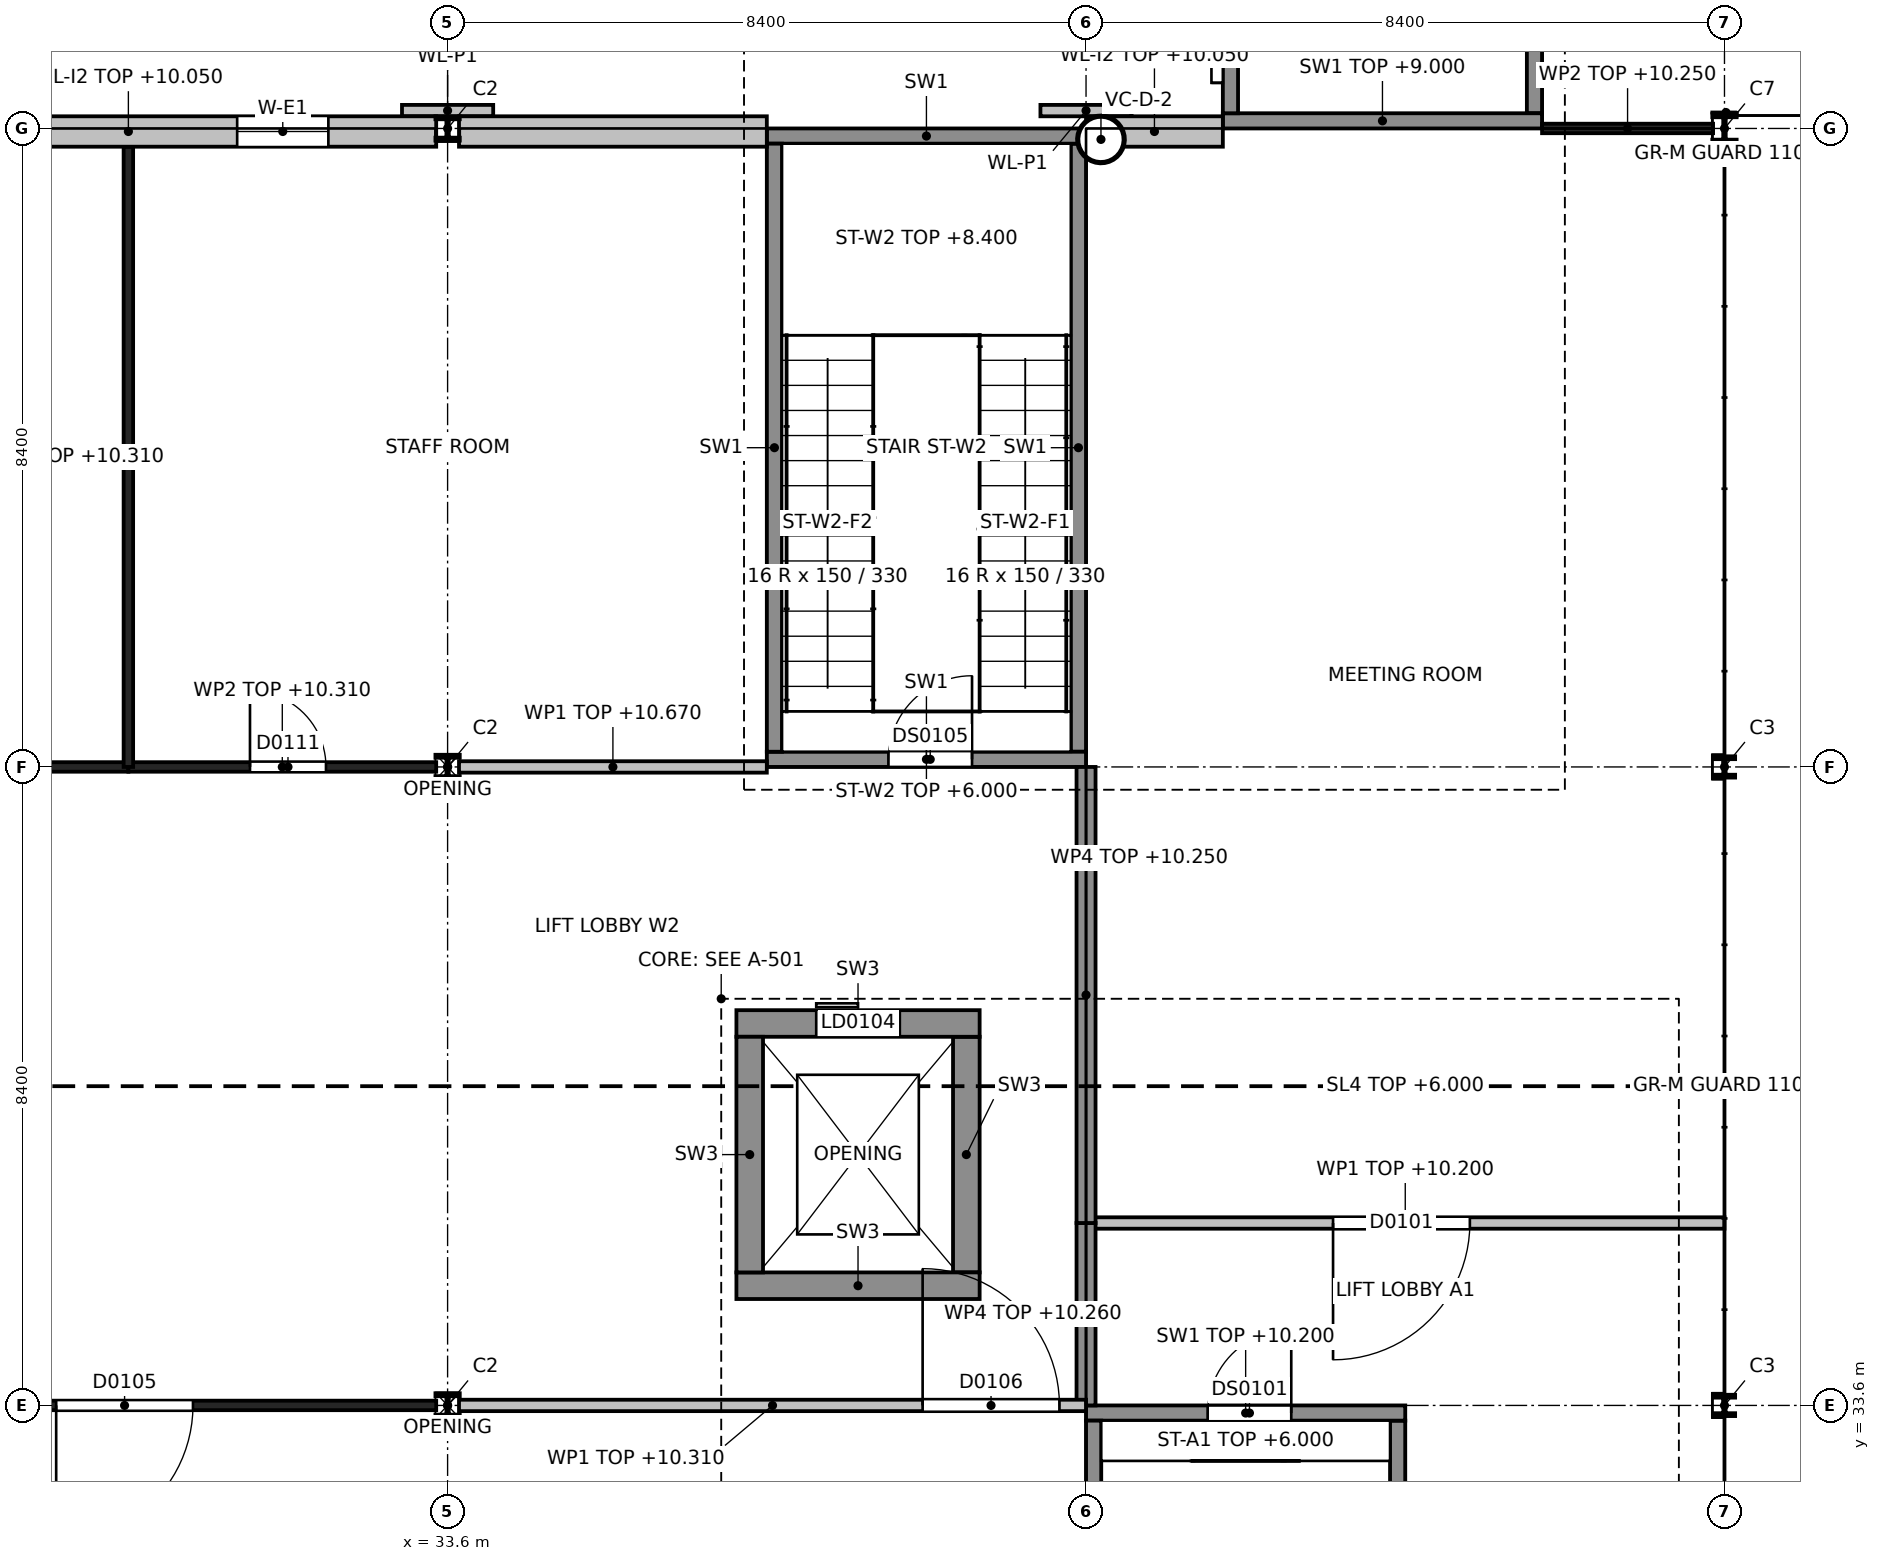
"""IFC4 building model, lengths in metres.
Left out: names, types, materials, properties, quantities, classifications, styles, units other than length and angle.
Written with IfcOpenShell. Run it as: python <this file> out.ifc"""

import sys

from ifc_helpers import new_model, si_unit, direction, frame, frame_2d, origin, origin_2d, place, context, subcontext, project, spatial, rectangle, hollow_circle, i_section, extrude, element, fill, save


model = new_model("IFC4")
c1 = context("Model", 3, precision=1e-05, world=origin(), true_north=direction((0.0, 1.0)))
c2 = subcontext(c1, "Body", "Model", "MODEL_VIEW")
j1 = project(units=[si_unit("LENGTHUNIT", "METRE"), si_unit("PLANEANGLEUNIT", "RADIAN")], contexts=[c1])
p1 = place(None, origin())
s1 = spatial("IfcSite", under=j1, at=p1, CompositionType="ELEMENT")
p2 = place(p1, origin())
s2 = spatial("IfcBuilding", under=s1, at=p2, CompositionType="ELEMENT")
p3 = place(p2, frame((0.0, 0.0, 6.0)))
s3 = spatial("IfcBuildingStorey", under=s2, at=p3, CompositionType="ELEMENT", Elevation=6.0)
p4 = place(p3, frame((42.211, 50.276, 0.0), z_axis=(-0.012102581287, -0.016831741202, 0.999785086913), x_axis=(0.811906374981, -0.583787665394, 0.0)))
e1 = element("IfcColumn", 1, at=p4, inside=s3, PredefinedType="COLUMN", context=c2, shape_type="SweptSolid", body=[
    extrude(hollow_circle(Radius=0.305, WallThickness=0.02, at=origin_2d()), origin(), (0.0, 0.0, 1.0), 4.801),
])
for number, where, z_axis, x_axis in (
    (2, (33.6, 33.6, 0.0), (0.0, 0.0, 1.0), (1.0, 0.0, 0.0)),
    (3, (33.6, 42.0, 0.0), (0.0, 0.0, 1.0), (1.0, 0.0, 0.0)),
    (4, (33.6, 50.4, 0.0), (0.0, 0.0, 1.0), (1.0, 0.0, 0.0)),
):
    element("IfcColumn", number, at=place(p3, frame(where, z_axis=z_axis, x_axis=x_axis)), inside=s3, PredefinedType="COLUMN", context=c2, shape_type="SweptSolid", body=[
        extrude(i_section(OverallWidth=0.3, OverallDepth=0.3, WebThickness=0.011, FlangeThickness=0.019, at=origin_2d()), origin(), (0.0, 0.0, 1.0), 4.8),
    ])
for number, where, z_axis, x_axis in (
    (5, (50.4, 33.6, 0.0), (0.0, 0.0, 1.0), (1.0, 0.0, 0.0)),
    (6, (50.4, 42.0, 0.0), (0.0, 0.0, 1.0), (1.0, 0.0, 0.0)),
):
    element("IfcColumn", number, at=place(p3, frame(where, z_axis=z_axis, x_axis=x_axis)), inside=s3, PredefinedType="COLUMN", context=c2, shape_type="SweptSolid", body=[
        extrude(i_section(OverallWidth=0.26, OverallDepth=0.26, WebThickness=0.01, FlangeThickness=0.018, at=origin_2d()), origin(), (0.0, 0.0, 1.0), 4.8),
    ])
p5 = place(p3, frame((50.4, 50.4, 0.0), z_axis=(0.0, 0.0, 1.0), x_axis=(1.0, 0.0, 0.0)))
e7 = element("IfcColumn", 7, at=p5, inside=s3, PredefinedType="COLUMN", context=c2, shape_type="SweptSolid", body=[
    extrude(i_section(OverallWidth=0.3, OverallDepth=0.36, WebThickness=0.012, FlangeThickness=0.022, at=origin_2d()), origin(), (0.0, 0.0, 1.0), 4.8),
])
p6 = place(p3, frame((42.0, 33.5, 0.0), z_axis=(0.0, 0.0, 1.0), x_axis=(1.0, 0.0, 0.0)))
e8 = element("IfcWall", 8, at=p6, inside=s3, PredefinedType="SHEAR", context=c2, shape_type="SweptSolid", body=[
    extrude(rectangle(XDim=4.2, YDim=0.2, at=frame_2d((2.1, 0.0))), origin(), (0.0, 0.0, 1.0), 4.2),
])
p7 = place(p6, frame((1.6, 0.0, 0.0)))
e9 = element("IfcOpeningElement", 9, at=p7, cuts=e8, PredefinedType="OPENING", context=c2, shape_type="SweptSolid", body=[
    extrude(rectangle(XDim=1.1, YDim=2.1, at=frame_2d((0.55, 1.05))), frame((0.0, 0.1, 0.0), z_axis=(0.0, -1.0, 0.0), x_axis=(1.0, 0.0, 0.0)), (0.0, 0.0, 1.0), 0.2),
])
for number, where, z_axis, x_axis in (
    (10, (42.1, 25.4, 0.0), (0.0, 0.0, 1.0), (0.0, 1.0, 0.0)),
    (11, (46.1, 25.4, 0.0), (0.0, 0.0, 1.0), (0.0, 1.0, 0.0)),
):
    element("IfcWall", number, at=place(p3, frame(where, z_axis=z_axis, x_axis=x_axis)), inside=s3, PredefinedType="SHEAR", context=c2, shape_type="SweptSolid", body=[
        extrude(rectangle(XDim=8.0, YDim=0.2, at=frame_2d((4.0, 0.0))), origin(), (0.0, 0.0, 1.0), 4.2),
    ])
p8 = place(p3, frame((43.8, 50.5, 0.0), z_axis=(0.0, 0.0, 1.0), x_axis=(1.0, 0.0, 0.0)))
e12 = element("IfcWall", 12, at=p8, inside=s3, PredefinedType="SHEAR", context=c2, shape_type="SweptSolid", body=[
    extrude(rectangle(XDim=4.2, YDim=0.2, at=frame_2d((2.1, 0.0))), origin(), (0.0, 0.0, 1.0), 3.0),
])
for number, where, z_axis, x_axis in (
    (13, (43.9, 50.6, 0.0), (0.0, 0.0, 1.0), (0.0, 1.0, 0.0)),
    (14, (47.9, 50.6, 0.0), (0.0, 0.0, 1.0), (0.0, 1.0, 0.0)),
):
    element("IfcWall", number, at=place(p3, frame(where, z_axis=z_axis, x_axis=x_axis)), inside=s3, PredefinedType="SHEAR", context=c2, shape_type="SweptSolid", body=[
        extrude(rectangle(XDim=8.0, YDim=0.2, at=frame_2d((4.0, 0.0))), origin(), (0.0, 0.0, 1.0), 3.0),
    ])
p9 = place(p3, frame((37.8, 42.1, 0.0), z_axis=(0.0, 0.0, 1.0), x_axis=(1.0, 0.0, 0.0)))
e15 = element("IfcWall", 15, at=p9, inside=s3, PredefinedType="SHEAR", context=c2, shape_type="SweptSolid", body=[
    extrude(rectangle(XDim=4.2, YDim=0.2, at=frame_2d((2.1, 0.0))), origin(), (0.0, 0.0, 1.0), 4.8),
])
p10 = place(p9, frame((1.6, 0.0, 0.0)))
e16 = element("IfcOpeningElement", 16, at=p10, cuts=e15, PredefinedType="OPENING", context=c2, shape_type="SweptSolid", body=[
    extrude(rectangle(XDim=1.1, YDim=2.1, at=frame_2d((0.55, 1.05))), frame((0.0, 0.1, 0.0), z_axis=(0.0, -1.0, 0.0), x_axis=(1.0, 0.0, 0.0)), (0.0, 0.0, 1.0), 0.2),
])
p11 = place(p3, frame((37.8, 50.3, 0.0), z_axis=(0.0, 0.0, 1.0), x_axis=(1.0, 0.0, 0.0)))
e17 = element("IfcWall", 17, at=p11, inside=s3, PredefinedType="SHEAR", context=c2, shape_type="SweptSolid", body=[
    extrude(rectangle(XDim=4.2, YDim=0.2, at=frame_2d((2.1, 0.0))), origin(), (0.0, 0.0, 1.0), 4.8),
])
for number, where, z_axis, x_axis in (
    (18, (37.9, 42.2, 0.0), (0.0, 0.0, 1.0), (0.0, 1.0, 0.0)),
    (19, (41.9, 42.2, 0.0), (0.0, 0.0, 1.0), (0.0, 1.0, 0.0)),
):
    element("IfcWall", number, at=place(p3, frame(where, z_axis=z_axis, x_axis=x_axis)), inside=s3, PredefinedType="SHEAR", context=c2, shape_type="SweptSolid", body=[
        extrude(rectangle(XDim=8.0, YDim=0.2, at=frame_2d((4.0, 0.0))), origin(), (0.0, 0.0, 1.0), 4.8),
    ])
p12 = place(p3, frame((37.4, 35.175, 0.0), z_axis=(0.0, 0.0, 1.0), x_axis=(1.0, 0.0, 0.0)))
e20 = element("IfcWall", 20, at=p12, inside=s3, PredefinedType="SHEAR", context=c2, shape_type="SweptSolid", body=[
    extrude(rectangle(XDim=3.2, YDim=0.35, at=frame_2d((1.6, 0.0))), origin(), (0.0, 0.0, 1.0), 4.8),
])
p13 = place(p3, frame((37.4, 38.625, 0.0), z_axis=(0.0, 0.0, 1.0), x_axis=(1.0, 0.0, 0.0)))
e21 = element("IfcWall", 21, at=p13, inside=s3, PredefinedType="SHEAR", context=c2, shape_type="SweptSolid", body=[
    extrude(rectangle(XDim=3.2, YDim=0.35, at=frame_2d((1.6, 0.0))), origin(), (0.0, 0.0, 1.0), 4.8),
])
p14 = place(p13, frame((1.05, 0.0, 0.0)))
e22 = element("IfcOpeningElement", 22, at=p14, cuts=e21, PredefinedType="OPENING", context=c2, shape_type="SweptSolid", body=[
    extrude(rectangle(XDim=1.1, YDim=2.1, at=frame_2d((0.55, 1.05))), frame((0.0, 0.175, 0.0), z_axis=(0.0, -1.0, 0.0), x_axis=(1.0, 0.0, 0.0)), (0.0, 0.0, 1.0), 0.35),
])
for number, where, z_axis, x_axis in (
    (23, (37.575, 35.35, 0.0), (0.0, 0.0, 1.0), (0.0, 1.0, 0.0)),
    (24, (40.425, 35.35, 0.0), (0.0, 0.0, 1.0), (0.0, 1.0, 0.0)),
):
    element("IfcWall", number, at=place(p3, frame(where, z_axis=z_axis, x_axis=x_axis)), inside=s3, PredefinedType="SHEAR", context=c2, shape_type="SweptSolid", body=[
        extrude(rectangle(XDim=3.1, YDim=0.35, at=frame_2d((1.55, 0.0))), origin(), (0.0, 0.0, 1.0), 4.8),
    ])
p15 = place(p3, frame((25.35, 50.36, 0.0), z_axis=(0.0, 0.0, 1.0), x_axis=(1.0, 0.0, 0.0)))
e25 = element("IfcWall", 25, at=p15, inside=s3, PredefinedType="SOLIDWALL", context=c2, shape_type="SweptSolid", body=[
    extrude(rectangle(XDim=8.1, YDim=0.4, at=frame_2d((4.05, 0.0))), origin(), (0.0, 0.0, 1.0), 4.05),
])
p16 = place(p15, frame((1.419, 0.0, 0.9)))
e26 = element("IfcOpeningElement", 26, at=p16, cuts=e25, PredefinedType="OPENING", context=c2, shape_type="SweptSolid", body=[
    extrude(rectangle(XDim=1.2, YDim=3.0, at=frame_2d((0.6, 1.5))), frame((0.0, 0.2, 0.0), z_axis=(0.0, -1.0, 0.0), x_axis=(1.0, 0.0, 0.0)), (0.0, 0.0, 1.0), 0.4),
])
p17 = place(p15, frame((5.481, 0.0, 0.9)))
e27 = element("IfcOpeningElement", 27, at=p17, cuts=e25, PredefinedType="OPENING", context=c2, shape_type="SweptSolid", body=[
    extrude(rectangle(XDim=1.2, YDim=3.0, at=frame_2d((0.6, 1.5))), frame((0.0, 0.2, 0.0), z_axis=(0.0, -1.0, 0.0), x_axis=(1.0, 0.0, 0.0)), (0.0, 0.0, 1.0), 0.4),
])
p18 = place(p3, frame((33.75, 50.36, 0.0), z_axis=(0.0, 0.0, 1.0), x_axis=(1.0, 0.0, 0.0)))
e28 = element("IfcWall", 28, at=p18, inside=s3, PredefinedType="SOLIDWALL", context=c2, shape_type="SweptSolid", body=[
    extrude(rectangle(XDim=4.05, YDim=0.4, at=frame_2d((2.025, 0.0))), origin(), (0.0, 0.0, 1.0), 4.05),
])
p19 = place(p3, frame((42.0, 50.36, 0.0), z_axis=(0.0, 0.0, 1.0), x_axis=(1.0, 0.0, 0.0)))
e29 = element("IfcWall", 29, at=p19, inside=s3, PredefinedType="SOLIDWALL", context=c2, shape_type="SweptSolid", body=[
    extrude(rectangle(XDim=1.8, YDim=0.4, at=frame_2d((0.9, 0.0))), origin(), (0.0, 0.0, 1.0), 4.05),
])
p20 = place(p3, frame((33.0, 50.635, 0.0), z_axis=(0.0, 0.0, 1.0), x_axis=(1.0, 0.0, 0.0)))
e30 = element("IfcWall", 30, at=p20, inside=s3, PredefinedType="SOLIDWALL", context=c2, shape_type="SweptSolid", body=[
    extrude(rectangle(XDim=1.2, YDim=0.15, at=frame_2d((0.6, 0.0))), origin(), (0.0, 0.0, 1.0), 4.8),
])
p21 = place(p3, frame((41.4, 50.635, 0.0), z_axis=(0.0, 0.0, 1.0), x_axis=(1.0, 0.0, 0.0)))
e31 = element("IfcWall", 31, at=p21, inside=s3, PredefinedType="SOLIDWALL", context=c2, shape_type="SweptSolid", body=[
    extrude(rectangle(XDim=1.2, YDim=0.15, at=frame_2d((0.6, 0.0))), origin(), (0.0, 0.0, 1.0), 4.8),
])
p22 = place(p3, frame((42.0, 36.0, 0.0), z_axis=(0.0, 0.0, 1.0), x_axis=(1.0, 0.0, 0.0)))
e32 = element("IfcWall", 32, at=p22, inside=s3, PredefinedType="PARTITIONING", context=c2, shape_type="SweptSolid", body=[
    extrude(rectangle(XDim=8.4, YDim=0.15, at=frame_2d((4.2, 0.0))), origin(), (0.0, 0.0, 1.0), 4.2),
])
p23 = place(p22, frame((3.25, 0.0, 0.0)))
e33 = element("IfcOpeningElement", 33, at=p23, cuts=e32, PredefinedType="OPENING", context=c2, shape_type="SweptSolid", body=[
    extrude(rectangle(XDim=1.8, YDim=2.1, at=frame_2d((0.9, 1.05))), frame((0.0, 0.075, 0.0), z_axis=(0.0, -1.0, 0.0), x_axis=(1.0, 0.0, 0.0)), (0.0, 0.0, 1.0), 0.15),
])
p24 = place(p3, frame((42.0, 33.6, 0.0), z_axis=(0.0, 0.0, 1.0), x_axis=(0.0, 1.0, 0.0)))
e34 = element("IfcWall", 34, at=p24, inside=s3, PredefinedType="PARTITIONING", context=c2, shape_type="SweptSolid", body=[
    extrude(rectangle(XDim=2.4, YDim=0.25, at=frame_2d((1.2, 0.0))), origin(), (0.0, 0.0, 1.0), 4.26),
])
p25 = place(p3, frame((42.0, 36.0, 0.0), z_axis=(0.0, 0.0, 1.0), x_axis=(0.0, 1.0, 0.0)))
e35 = element("IfcWall", 35, at=p25, inside=s3, PredefinedType="PARTITIONING", context=c2, shape_type="SweptSolid", body=[
    extrude(rectangle(XDim=6.0, YDim=0.25, at=frame_2d((3.0, 0.0))), origin(), (0.0, 0.0, 1.0), 4.25),
])
p26 = place(p3, frame((48.0, 50.4, 0.0), z_axis=(0.0, 0.0, 1.0), x_axis=(1.0, 0.0, 0.0)))
e36 = element("IfcWall", 36, at=p26, inside=s3, PredefinedType="PARTITIONING", context=c2, shape_type="SweptSolid", body=[
    extrude(rectangle(XDim=2.25, YDim=0.125, at=frame_2d((1.125, 0.0))), origin(), (0.0, 0.0, 1.0), 4.25),
])
p27 = place(p3, frame((25.35, 33.6, 0.0), z_axis=(0.0, 0.0, 1.0), x_axis=(1.0, 0.0, 0.0)))
e37 = element("IfcWall", 37, at=p27, inside=s3, PredefinedType="PARTITIONING", context=c2, shape_type="SweptSolid", body=[
    extrude(rectangle(XDim=8.1, YDim=0.125, at=frame_2d((4.05, 0.0))), origin(), (0.0, 0.0, 1.0), 4.31),
])
p28 = place(p27, frame((3.1, 0.0, 0.0)))
e38 = element("IfcOpeningElement", 38, at=p28, cuts=e37, PredefinedType="OPENING", context=c2, shape_type="SweptSolid", body=[
    extrude(rectangle(XDim=1.8, YDim=2.1, at=frame_2d((0.9, 1.05))), frame((0.0, 0.062, 0.0), z_axis=(0.0, -1.0, 0.0), x_axis=(1.0, 0.0, 0.0)), (0.0, 0.0, 1.0), 0.125),
])
p29 = place(p3, frame((33.75, 33.6, 0.0), z_axis=(0.0, 0.0, 1.0), x_axis=(1.0, 0.0, 0.0)))
e39 = element("IfcWall", 39, at=p29, inside=s3, PredefinedType="PARTITIONING", context=c2, shape_type="SweptSolid", body=[
    extrude(rectangle(XDim=8.25, YDim=0.15, at=frame_2d((4.125, 0.0))), origin(), (0.0, 0.0, 1.0), 4.31),
])
p30 = place(p29, frame((6.1, 0.0, 0.0)))
e40 = element("IfcOpeningElement", 40, at=p30, cuts=e39, PredefinedType="OPENING", context=c2, shape_type="SweptSolid", body=[
    extrude(rectangle(XDim=1.8, YDim=2.1, at=frame_2d((0.9, 1.05))), frame((0.0, 0.075, 0.0), z_axis=(0.0, -1.0, 0.0), x_axis=(1.0, 0.0, 0.0)), (0.0, 0.0, 1.0), 0.15),
])
p31 = place(p3, frame((25.35, 42.0, 0.0), z_axis=(0.0, 0.0, 1.0), x_axis=(1.0, 0.0, 0.0)))
e41 = element("IfcWall", 41, at=p31, inside=s3, PredefinedType="PARTITIONING", context=c2, shape_type="SweptSolid", body=[
    extrude(rectangle(XDim=4.05, YDim=0.125, at=frame_2d((2.025, 0.0))), origin(), (0.0, 0.0, 1.0), 4.31),
])
p32 = place(p3, frame((29.4, 42.0, 0.0), z_axis=(0.0, 0.0, 1.0), x_axis=(1.0, 0.0, 0.0)))
e42 = element("IfcWall", 42, at=p32, inside=s3, PredefinedType="PARTITIONING", context=c2, shape_type="SweptSolid", body=[
    extrude(rectangle(XDim=4.05, YDim=0.125, at=frame_2d((2.025, 0.0))), origin(), (0.0, 0.0, 1.0), 4.31),
])
p33 = place(p32, frame((1.6, 0.0, 0.0)))
e43 = element("IfcOpeningElement", 43, at=p33, cuts=e42, PredefinedType="OPENING", context=c2, shape_type="SweptSolid", body=[
    extrude(rectangle(XDim=1.0, YDim=2.2, at=frame_2d((0.5, 1.1))), frame((0.0, 0.062, 0.0), z_axis=(0.0, -1.0, 0.0), x_axis=(1.0, 0.0, 0.0)), (0.0, 0.0, 1.0), 0.125),
])
p34 = place(p3, frame((33.75, 42.0, 0.0), z_axis=(0.0, 0.0, 1.0), x_axis=(1.0, 0.0, 0.0)))
e44 = element("IfcWall", 44, at=p34, inside=s3, PredefinedType="PARTITIONING", context=c2, shape_type="SweptSolid", body=[
    extrude(rectangle(XDim=4.05, YDim=0.15, at=frame_2d((2.025, 0.0))), origin(), (0.0, 0.0, 1.0), 4.67),
])
p35 = place(p3, frame((29.4, 42.0, 0.0), z_axis=(0.0, 0.0, 1.0), x_axis=(0.0, 1.0, 0.0)))
e45 = element("IfcWall", 45, at=p35, inside=s3, PredefinedType="PARTITIONING", context=c2, shape_type="SweptSolid", body=[
    extrude(rectangle(XDim=8.159, YDim=0.125, at=frame_2d((4.08, 0.0))), origin(), (0.0, 0.0, 1.0), 4.31),
])
p36 = place(p17, origin())
e46 = element("IfcWindow", 46, at=p36, inside=s3, PartitioningType="SINGLE_PANEL", PredefinedType="WINDOW", context=c2, shape_type="SweptSolid", body=[
    extrude(rectangle(XDim=1.2, YDim=3.0, at=frame_2d((0.6, 1.5))), frame((0.0, 0.03, 0.0), z_axis=(0.0, -1.0, 0.0), x_axis=(1.0, 0.0, 0.0)), (0.0, 0.0, 1.0), 0.06),
])
fill(e27, e46)
p37 = place(p23, origin())
e47 = element("IfcDoor", 47, at=p37, inside=s3, OperationType="DOUBLE_DOOR_DOUBLE_SWING", PredefinedType="DOOR", context=c2, shape_type="SweptSolid", body=[
    extrude(rectangle(XDim=1.8, YDim=2.1, at=frame_2d((0.9, 1.05))), frame((0.0, 0.025, 0.0), z_axis=(0.0, -1.0, 0.0), x_axis=(1.0, 0.0, 0.0)), (0.0, 0.0, 1.0), 0.05),
])
fill(e33, e47)
p38 = place(p28, origin())
e48 = element("IfcDoor", 48, at=p38, inside=s3, OperationType="DOUBLE_DOOR_DOUBLE_SWING", PredefinedType="DOOR", context=c2, shape_type="SweptSolid", body=[
    extrude(rectangle(XDim=1.8, YDim=2.1, at=frame_2d((0.9, 1.05))), frame((0.0, 0.025, 0.0), z_axis=(0.0, -1.0, 0.0), x_axis=(1.0, 0.0, 0.0)), (0.0, 0.0, 1.0), 0.05),
])
fill(e38, e48)
p39 = place(p30, origin())
e49 = element("IfcDoor", 49, at=p39, inside=s3, OperationType="DOUBLE_DOOR_DOUBLE_SWING", PredefinedType="DOOR", context=c2, shape_type="SweptSolid", body=[
    extrude(rectangle(XDim=1.8, YDim=2.1, at=frame_2d((0.9, 1.05))), frame((0.0, 0.025, 0.0), z_axis=(0.0, -1.0, 0.0), x_axis=(1.0, 0.0, 0.0)), (0.0, 0.0, 1.0), 0.05),
])
fill(e40, e49)
p40 = place(p33, origin())
e50 = element("IfcDoor", 50, at=p40, inside=s3, OperationType="SINGLE_SWING_LEFT", PredefinedType="DOOR", context=c2, shape_type="SweptSolid", body=[
    extrude(rectangle(XDim=1.0, YDim=2.2, at=frame_2d((0.5, 1.1))), frame((0.0, 0.025, 0.0), z_axis=(0.0, -1.0, 0.0), x_axis=(1.0, 0.0, 0.0)), (0.0, 0.0, 1.0), 0.05),
])
fill(e43, e50)
p41 = place(p7, origin())
e51 = element("IfcDoor", 51, at=p41, inside=s3, OperationType="SINGLE_SWING_RIGHT", PredefinedType="DOOR", context=c2, shape_type="SweptSolid", body=[
    extrude(rectangle(XDim=1.1, YDim=2.1, at=frame_2d((0.55, 1.05))), frame((0.0, 0.025, 0.0), z_axis=(0.0, -1.0, 0.0), x_axis=(1.0, 0.0, 0.0)), (0.0, 0.0, 1.0), 0.05),
])
fill(e9, e51)
p42 = place(p10, origin())
e52 = element("IfcDoor", 52, at=p42, inside=s3, OperationType="SINGLE_SWING_RIGHT", PredefinedType="DOOR", context=c2, shape_type="SweptSolid", body=[
    extrude(rectangle(XDim=1.1, YDim=2.1, at=frame_2d((0.55, 1.05))), frame((0.0, 0.025, 0.0), z_axis=(0.0, -1.0, 0.0), x_axis=(1.0, 0.0, 0.0)), (0.0, 0.0, 1.0), 0.05),
])
fill(e16, e52)
p43 = place(p14, origin())
e53 = element("IfcDoor", 53, at=p43, inside=s3, OperationType="SLIDING_TO_RIGHT", PredefinedType="DOOR", context=c2, shape_type="SweptSolid", body=[
    extrude(rectangle(XDim=1.1, YDim=2.1, at=frame_2d((0.55, 1.05))), frame((0.0, 0.025, 0.0), z_axis=(0.0, -1.0, 0.0), x_axis=(1.0, 0.0, 0.0)), (0.0, 0.0, 1.0), 0.05),
])
fill(e22, e53)
save(model, sys.argv[1])
